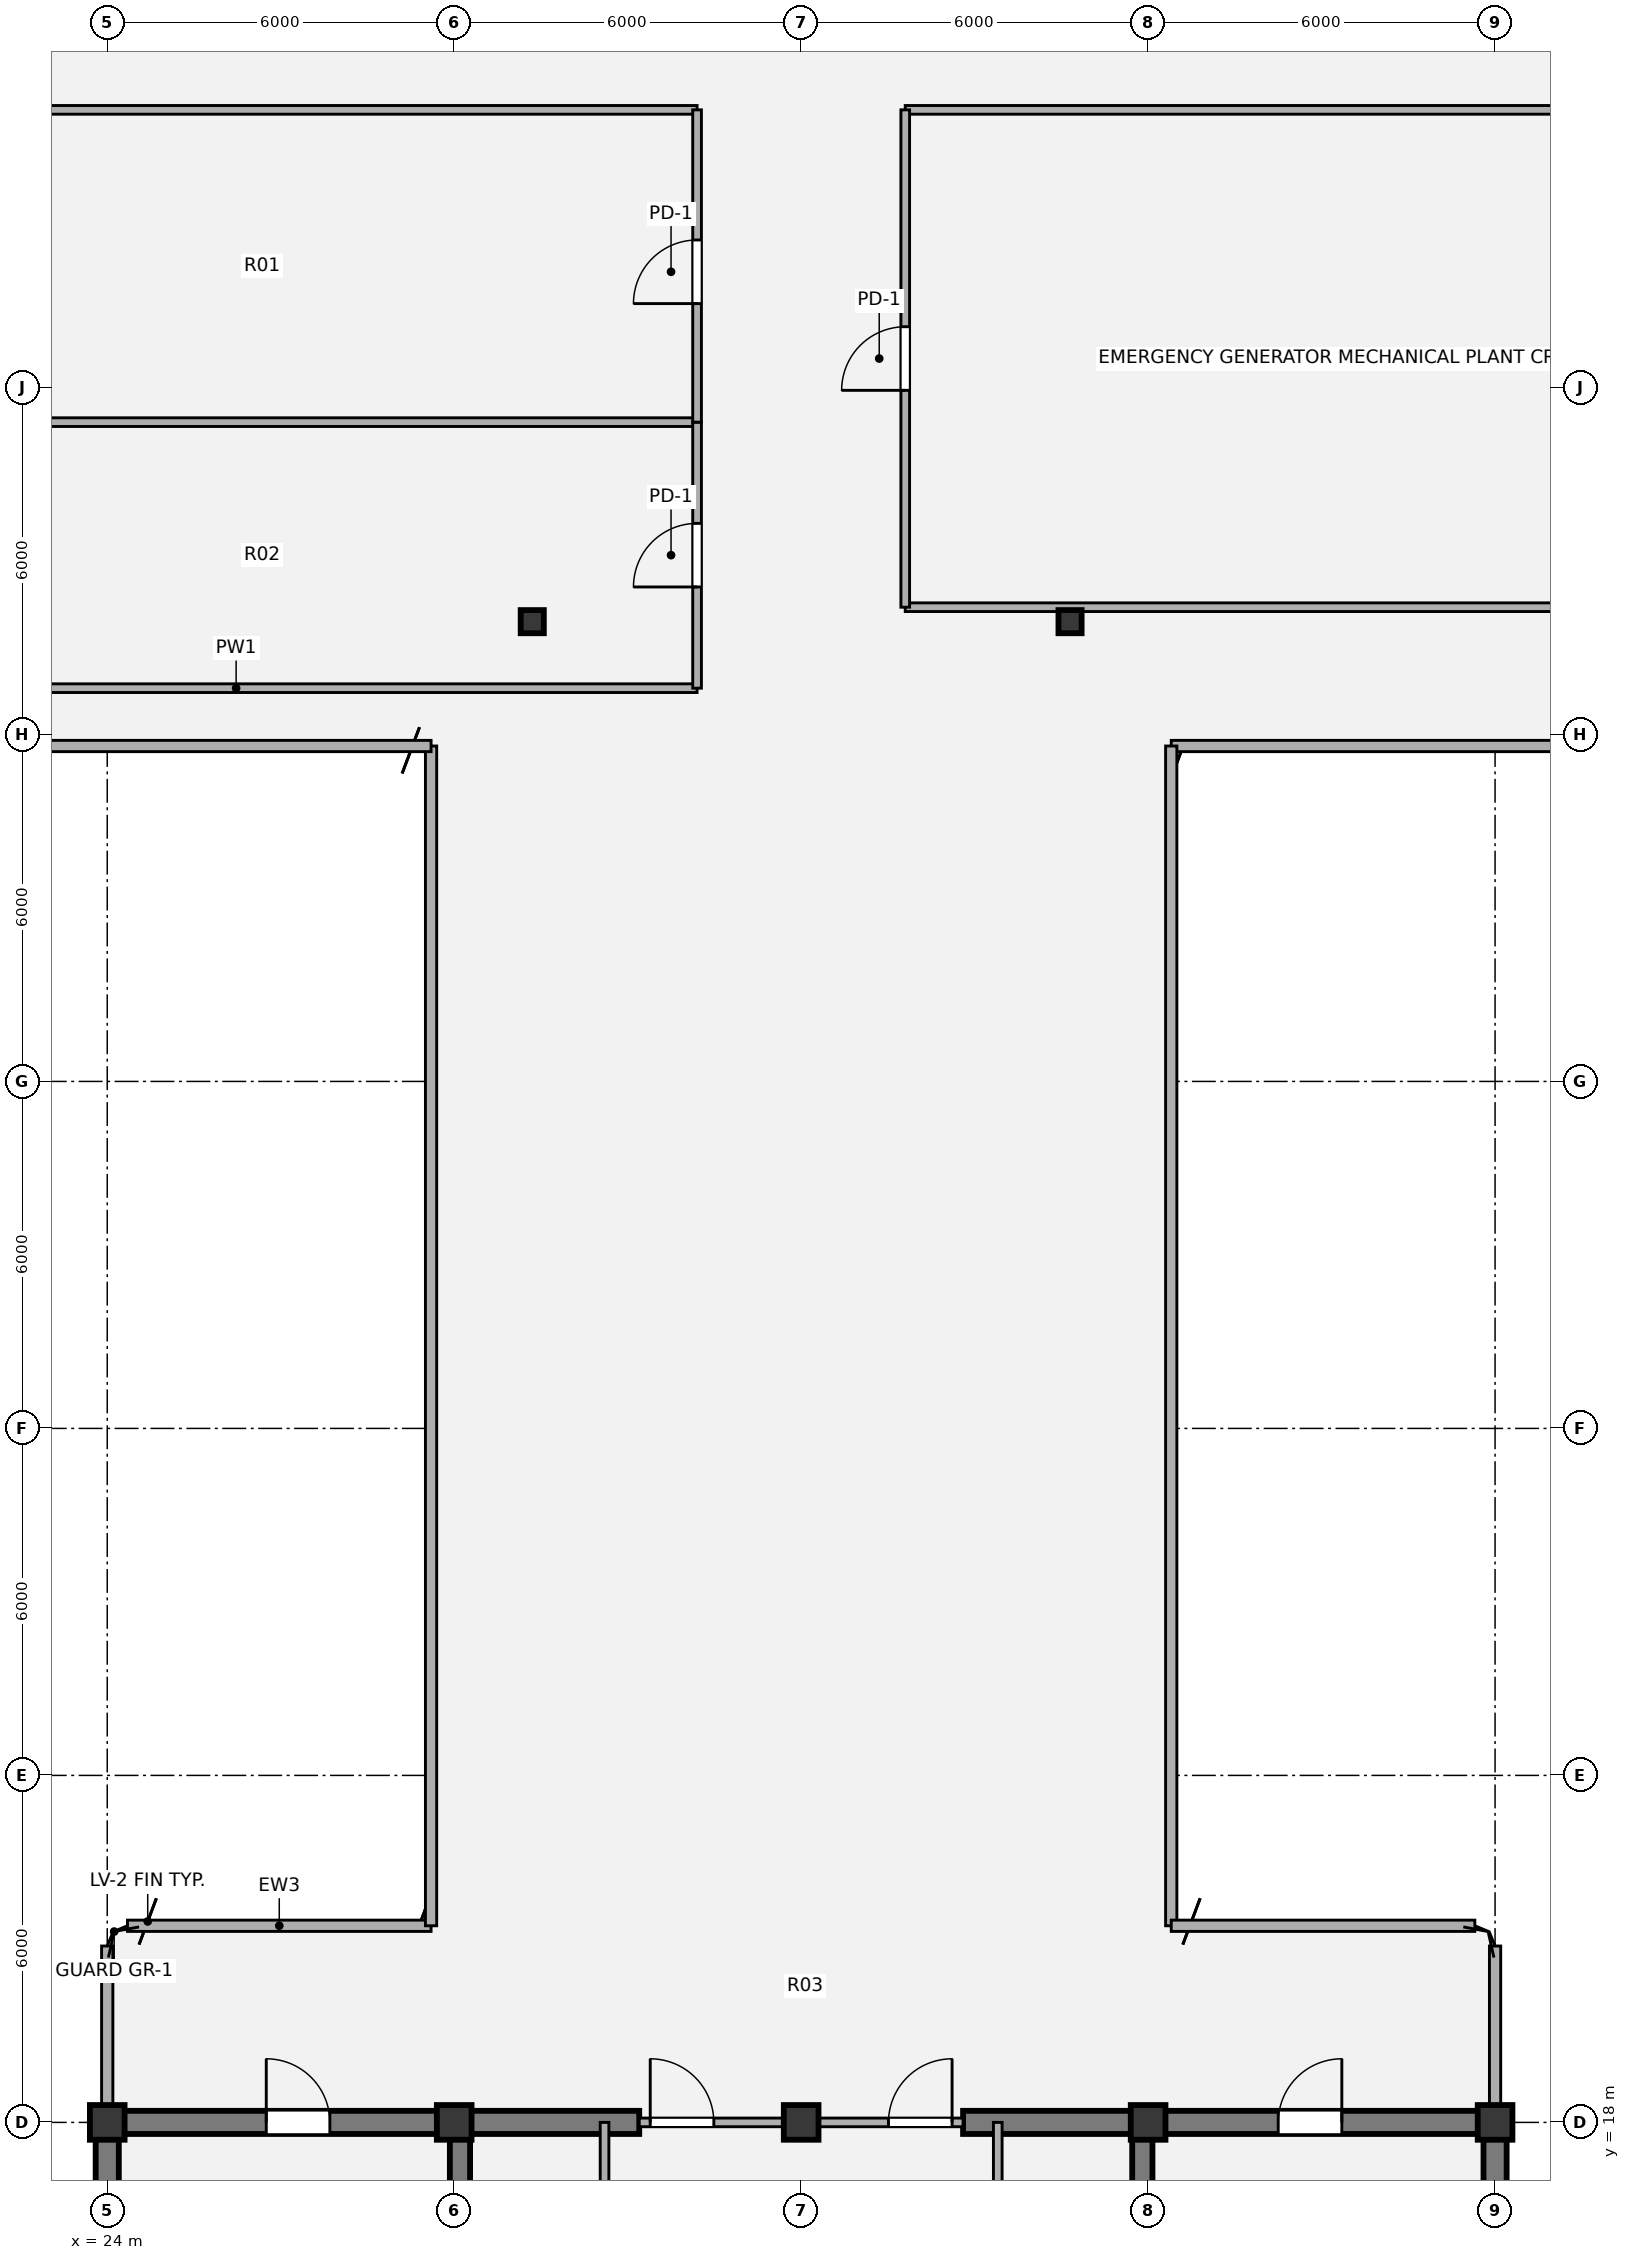
"""IFC4 building model, lengths in metres.
Left out: names, types, materials, properties, quantities, classifications, styles, units other than length and angle.
Written with IfcOpenShell. Run it as: python <this file> out.ifc"""

import sys

from ifc_helpers import new_model, si_unit, direction, frame, frame_2d, origin, origin_2d, place, context, subcontext, project, spatial, rectangle, hollow_rectangle, extrude, source, transform, mapped, element, fill, save


model = new_model("IFC4")
c1 = context("Model", 3, precision=1e-05, world=origin(), true_north=direction((0.0, 1.0)))
c2 = subcontext(c1, "Body", "Model", "MODEL_VIEW")
j1 = project(units=[si_unit("LENGTHUNIT", "METRE"), si_unit("PLANEANGLEUNIT", "RADIAN")], contexts=[c1])
p1 = place(None, origin())
s1 = spatial("IfcSite", under=j1, at=p1, CompositionType="ELEMENT")
p2 = place(p1, origin())
s2 = spatial("IfcBuilding", under=s1, at=p2, CompositionType="ELEMENT")
p3 = place(p2, frame((0.0, 0.0, 307.8)))
s3 = spatial("IfcBuildingStorey", under=s2, at=p3, CompositionType="ELEMENT", Elevation=307.8)
m1 = source(origin(), c2, "Body", "SweptSolid", [
    extrude(rectangle(XDim=0.6, YDim=0.6, at=origin_2d()), origin(), (0.0, 0.0, 1.0), 3.96),
])
for number, where, z_axis, x_axis in (
    (1, (24.0, 18.0, 0.0), (0.0, 0.0, 1.0), (1.0, 0.0, 0.0)),
    (2, (30.0, 18.0, 0.0), (0.0, 0.0, 1.0), (1.0, 0.0, 0.0)),
    (3, (36.0, 18.0, 0.0), (0.0, 0.0, 1.0), (1.0, 0.0, 0.0)),
    (4, (42.0, 18.0, 0.0), (0.0, 0.0, 1.0), (1.0, 0.0, 0.0)),
    (5, (48.0, 18.0, 0.0), (0.0, 0.0, 1.0), (1.0, 0.0, 0.0)),
):
    element("IfcColumn", number, at=place(p3, frame(where, z_axis=z_axis, x_axis=x_axis)), inside=s3, PredefinedType="COLUMN", context=c2, shape_type="MappedRepresentation", body=[
        mapped(m1, transform((0.0, 0.0, 0.0), x_axis=(1.0, 0.0, 0.0), y_axis=(0.0, 1.0, 0.0), z_axis=(0.0, 0.0, 1.0), scale=1.0)),
    ])
for number, where, z_axis, x_axis in (
    (6, (24.0, 6.0, 0.0), (0.0, 0.0, 1.0), (0.0, 1.0, 0.0)),
    (7, (48.0, 18.0, 0.0), (0.0, 0.0, 1.0), (0.0, -1.0, 0.0)),
):
    element("IfcWall", number, at=place(p3, frame(where, z_axis=z_axis, x_axis=x_axis)), inside=s3, PredefinedType="SHEAR", context=c2, shape_type="SweptSolid", body=[
        extrude(rectangle(XDim=12.0, YDim=0.4, at=frame_2d((6.0, 0.0))), origin(), (0.0, 0.0, 1.0), 3.96),
    ])
p4 = place(p3, frame((23.8, 18.0, 0.0), z_axis=(0.0, 0.0, 1.0), x_axis=(1.0, 0.0, 0.0)))
e8 = element("IfcWall", 8, at=p4, inside=s3, PredefinedType="SHEAR", context=c2, shape_type="SweptSolid", body=[
    extrude(rectangle(XDim=9.4, YDim=0.4, at=frame_2d((4.7, 0.0))), origin(), (0.0, 0.0, 1.0), 3.96),
])
p5 = place(p4, frame((2.95, 0.0, 0.0)))
e9 = element("IfcOpeningElement", 9, at=p5, cuts=e8, PredefinedType="OPENING", context=c2, shape_type="SweptSolid", body=[
    extrude(rectangle(XDim=1.1, YDim=2.1, at=origin_2d()), frame((0.55, 0.21, 1.05), z_axis=(0.0, -1.0, 0.0), x_axis=(1.0, 0.0, 0.0)), (0.0, 0.0, 1.0), 0.42),
])
p6 = place(p3, frame((38.8, 18.0, 0.0), z_axis=(0.0, 0.0, 1.0), x_axis=(1.0, 0.0, 0.0)))
e10 = element("IfcWall", 10, at=p6, inside=s3, PredefinedType="SHEAR", context=c2, shape_type="SweptSolid", body=[
    extrude(rectangle(XDim=9.4, YDim=0.4, at=frame_2d((4.7, 0.0))), origin(), (0.0, 0.0, 1.0), 3.96),
])
p7 = place(p6, frame((5.45, 0.0, 0.0)))
e11 = element("IfcOpeningElement", 11, at=p7, cuts=e10, PredefinedType="OPENING", context=c2, shape_type="SweptSolid", body=[
    extrude(rectangle(XDim=1.1, YDim=2.1, at=origin_2d()), frame((0.55, 0.21, 1.05), z_axis=(0.0, -1.0, 0.0), x_axis=(1.0, 0.0, 0.0)), (0.0, 0.0, 1.0), 0.42),
])
for number, where, z_axis, x_axis in (
    (12, (30.1, 6.0, 0.0), (0.0, 0.0, 1.0), (0.0, 1.0, 0.0)),
    (13, (41.9, 18.0, 0.0), (0.0, 0.0, 1.0), (0.0, -1.0, 0.0)),
):
    element("IfcWall", number, at=place(p3, frame(where, z_axis=z_axis, x_axis=x_axis)), inside=s3, PredefinedType="SHEAR", context=c2, shape_type="SweptSolid", body=[
        extrude(rectangle(XDim=12.0, YDim=0.35, at=frame_2d((6.0, 0.0))), origin(), (0.0, 0.0, 1.0), 3.96),
    ])
m2 = source(origin(), c2, "Body", "SweptSolid", [
    extrude(hollow_rectangle(XDim=0.4, YDim=0.4, WallThickness=0.02, OuterFilletRadius=0.04, at=origin_2d()), origin(), (0.0, 0.0, 1.0), 3.96),
])
for number, where, z_axis, x_axis in (
    (14, (31.35, 43.95, 0.0), (0.0, 0.0, 1.0), (1.0, 0.0, 0.0)),
    (15, (40.65, 43.95, 0.0), (0.0, 0.0, 1.0), (1.0, 0.0, 0.0)),
):
    element("IfcColumn", number, at=place(p3, frame(where, z_axis=z_axis, x_axis=x_axis)), inside=s3, PredefinedType="COLUMN", context=c2, shape_type="MappedRepresentation", body=[
        mapped(m2, transform((0.0, 0.0, 0.0), x_axis=(1.0, 0.0, 0.0), y_axis=(0.0, 1.0, 0.0), z_axis=(0.0, 0.0, 1.0), scale=1.0)),
    ])
for number, where, z_axis, x_axis in (
    (16, (48.0, 21.05, 0.0), (0.0, 0.0, 1.0), (0.0, -1.0, 0.0)),
    (17, (24.0, 18.28, 0.0), (0.0, 0.0, 1.0), (0.0, 1.0, 0.0)),
):
    element("IfcWall", number, at=place(p3, frame(where, z_axis=z_axis, x_axis=x_axis)), inside=s3, PredefinedType="SOLIDWALL", context=c2, shape_type="SweptSolid", body=[
        extrude(rectangle(XDim=2.77, YDim=0.195, at=frame_2d((1.385, 0.0))), origin(), (0.0, 0.0, 1.0), 2.898),
    ])
p8 = place(p3, frame((24.35, 21.4, 0.0), z_axis=(0.0, 0.0, 1.0), x_axis=(1.0, 0.0, 0.0)))
e18 = element("IfcWall", 18, at=p8, inside=s3, PredefinedType="SOLIDWALL", context=c2, shape_type="SweptSolid", body=[
    extrude(rectangle(XDim=5.25, YDim=0.195, at=frame_2d((2.625, 0.0))), origin(), (0.0, 0.0, 1.0), 3.71),
])
p9 = place(p3, frame((29.6, 21.4, 0.0), z_axis=(0.0, 0.0, 1.0), x_axis=(0.0, 1.0, 0.0)))
e19 = element("IfcWall", 19, at=p9, inside=s3, PredefinedType="SOLIDWALL", context=c2, shape_type="SweptSolid", body=[
    extrude(rectangle(XDim=20.4, YDim=0.195, at=frame_2d((10.2, 0.0))), origin(), (0.0, 0.0, 1.0), 2.998),
])
for number, where, z_axis, x_axis in (
    (20, (29.6, 41.8, 0.0), (0.0, 0.0, 1.0), (-1.0, 0.0, 0.0)),
    (21, (52.25, 41.8, 0.0), (0.0, 0.0, 1.0), (-1.0, 0.0, 0.0)),
):
    element("IfcWall", number, at=place(p3, frame(where, z_axis=z_axis, x_axis=x_axis)), inside=s3, PredefinedType="SOLIDWALL", context=c2, shape_type="SweptSolid", body=[
        extrude(rectangle(XDim=9.85, YDim=0.195, at=frame_2d((4.925, 0.0))), origin(), (0.0, 0.0, 1.0), 3.71),
    ])
p10 = place(p3, frame((42.4, 41.8, 0.0), z_axis=(0.0, 0.0, 1.0), x_axis=(0.0, -1.0, 0.0)))
e22 = element("IfcWall", 22, at=p10, inside=s3, PredefinedType="SOLIDWALL", context=c2, shape_type="SweptSolid", body=[
    extrude(rectangle(XDim=20.4, YDim=0.195, at=frame_2d((10.2, 0.0))), origin(), (0.0, 0.0, 1.0), 2.998),
])
p11 = place(p3, frame((42.4, 21.4, 0.0), z_axis=(0.0, 0.0, 1.0), x_axis=(1.0, 0.0, 0.0)))
e23 = element("IfcWall", 23, at=p11, inside=s3, PredefinedType="SOLIDWALL", context=c2, shape_type="SweptSolid", body=[
    extrude(rectangle(XDim=5.25, YDim=0.195, at=frame_2d((2.625, 0.0))), origin(), (0.0, 0.0, 1.0), 3.71),
])
p12 = place(p3, frame((32.6, 11.0, 0.0), z_axis=(0.0, 0.0, 1.0), x_axis=(0.0, 1.0, 0.0)))
e24 = element("IfcWall", 24, at=p12, inside=s3, PredefinedType="PARTITIONING", context=c2, shape_type="SweptSolid", body=[
    extrude(rectangle(XDim=7.0, YDim=0.15, at=frame_2d((3.5, 0.0))), origin(), (0.0, 0.0, 1.0), 3.68),
])
p13 = place(p12, frame((2.4, 0.0, 0.0)))
e25 = element("IfcOpeningElement", 25, at=p13, cuts=e24, PredefinedType="OPENING", context=c2, shape_type="SweptSolid", body=[
    extrude(rectangle(XDim=1.1, YDim=2.1, at=origin_2d()), frame((0.55, 0.085, 1.05), z_axis=(0.0, -1.0, 0.0), x_axis=(1.0, 0.0, 0.0)), (0.0, 0.0, 1.0), 0.17),
])
p14 = place(p3, frame((39.4, 11.0, 0.0), z_axis=(0.0, 0.0, 1.0), x_axis=(0.0, 1.0, 0.0)))
e26 = element("IfcWall", 26, at=p14, inside=s3, PredefinedType="PARTITIONING", context=c2, shape_type="SweptSolid", body=[
    extrude(rectangle(XDim=7.0, YDim=0.15, at=frame_2d((3.5, 0.0))), origin(), (0.0, 0.0, 1.0), 3.68),
])
p15 = place(p14, frame((2.4, 0.0, 0.0)))
e27 = element("IfcOpeningElement", 27, at=p15, cuts=e26, PredefinedType="OPENING", context=c2, shape_type="SweptSolid", body=[
    extrude(rectangle(XDim=1.1, YDim=2.1, at=origin_2d()), frame((0.55, 0.085, 1.05), z_axis=(0.0, -1.0, 0.0), x_axis=(1.0, 0.0, 0.0)), (0.0, 0.0, 1.0), 0.17),
])
p16 = place(p3, frame((33.2, 18.0, 0.0), z_axis=(0.0, 0.0, 1.0), x_axis=(1.0, 0.0, 0.0)))
e28 = element("IfcWall", 28, at=p16, inside=s3, PredefinedType="PARTITIONING", context=c2, shape_type="SweptSolid", body=[
    extrude(rectangle(XDim=5.6, YDim=0.15, at=frame_2d((2.8, 0.0))), origin(), (0.0, 0.0, 1.0), 2.695),
])
p17 = place(p16, frame((0.19, 0.0, 0.0)))
e29 = element("IfcOpeningElement", 29, at=p17, cuts=e28, PredefinedType="OPENING", context=c2, shape_type="SweptSolid", body=[
    extrude(rectangle(XDim=1.1, YDim=2.1, at=origin_2d()), frame((0.55, 0.085, 1.05), z_axis=(0.0, -1.0, 0.0), x_axis=(1.0, 0.0, 0.0)), (0.0, 0.0, 1.0), 0.17),
])
p18 = place(p16, frame((4.31, 0.0, 0.0)))
e30 = element("IfcOpeningElement", 30, at=p18, cuts=e28, PredefinedType="OPENING", context=c2, shape_type="SweptSolid", body=[
    extrude(rectangle(XDim=1.1, YDim=2.1, at=origin_2d()), frame((0.55, 0.085, 1.05), z_axis=(0.0, -1.0, 0.0), x_axis=(1.0, 0.0, 0.0)), (0.0, 0.0, 1.0), 0.17),
])
p19 = place(p3, frame((18.258, 42.8, 0.0), z_axis=(0.0, 0.0, 1.0), x_axis=(1.0, 0.0, 0.0)))
e31 = element("IfcWall", 31, at=p19, inside=s3, PredefinedType="PARTITIONING", context=c2, shape_type="SweptSolid", body=[
    extrude(rectangle(XDim=15.942, YDim=0.15, at=frame_2d((7.971, 0.0))), origin(), (0.0, 0.0, 1.0), 3.68),
])
p20 = place(p3, frame((37.8, 44.2, 0.0), z_axis=(0.0, 0.0, 1.0), x_axis=(1.0, 0.0, 0.0)))
e32 = element("IfcWall", 32, at=p20, inside=s3, PredefinedType="PARTITIONING", context=c2, shape_type="SweptSolid", body=[
    extrude(rectangle(XDim=15.05, YDim=0.15, at=frame_2d((7.525, 0.0))), origin(), (0.0, 0.0, 1.0), 3.083),
])
for number, where, z_axis, x_axis in (
    (33, (19.15, 47.4, 0.0), (0.0, 0.0, 1.0), (1.0, 0.0, 0.0)),
    (34, (19.15, 52.8, 0.0), (0.0, 0.0, 1.0), (1.0, 0.0, 0.0)),
    (35, (37.8, 52.8, 0.0), (0.0, 0.0, 1.0), (1.0, 0.0, 0.0)),
):
    element("IfcWall", number, at=place(p3, frame(where, z_axis=z_axis, x_axis=x_axis)), inside=s3, PredefinedType="PARTITIONING", context=c2, shape_type="SweptSolid", body=[
        extrude(rectangle(XDim=15.05, YDim=0.15, at=frame_2d((7.525, 0.0))), origin(), (0.0, 0.0, 1.0), 3.162),
    ])
p21 = place(p3, frame((34.2, 42.8, 0.0), z_axis=(0.0, 0.0, 1.0), x_axis=(0.0, 1.0, 0.0)))
e36 = element("IfcWall", 36, at=p21, inside=s3, PredefinedType="PARTITIONING", context=c2, shape_type="SweptSolid", body=[
    extrude(rectangle(XDim=4.6, YDim=0.15, at=frame_2d((2.3, 0.0))), origin(), (0.0, 0.0, 1.0), 3.68),
])
p22 = place(p21, frame((1.75, 0.0, 0.0)))
e37 = element("IfcOpeningElement", 37, at=p22, cuts=e36, PredefinedType="OPENING", context=c2, shape_type="SweptSolid", body=[
    extrude(rectangle(XDim=1.1, YDim=2.1, at=origin_2d()), frame((0.55, 0.085, 1.05), z_axis=(0.0, -1.0, 0.0), x_axis=(1.0, 0.0, 0.0)), (0.0, 0.0, 1.0), 0.17),
])
p23 = place(p3, frame((34.2, 47.4, 0.0), z_axis=(0.0, 0.0, 1.0), x_axis=(0.0, 1.0, 0.0)))
e38 = element("IfcWall", 38, at=p23, inside=s3, PredefinedType="PARTITIONING", context=c2, shape_type="SweptSolid", body=[
    extrude(rectangle(XDim=5.4, YDim=0.15, at=frame_2d((2.7, 0.0))), origin(), (0.0, 0.0, 1.0), 3.68),
])
p24 = place(p23, frame((2.05, 0.0, 0.0)))
e39 = element("IfcOpeningElement", 39, at=p24, cuts=e38, PredefinedType="OPENING", context=c2, shape_type="SweptSolid", body=[
    extrude(rectangle(XDim=1.1, YDim=2.1, at=origin_2d()), frame((0.55, 0.085, 1.05), z_axis=(0.0, -1.0, 0.0), x_axis=(1.0, 0.0, 0.0)), (0.0, 0.0, 1.0), 0.17),
])
p25 = place(p3, frame((37.8, 44.2, 0.0), z_axis=(0.0, 0.0, 1.0), x_axis=(0.0, 1.0, 0.0)))
e40 = element("IfcWall", 40, at=p25, inside=s3, PredefinedType="PARTITIONING", context=c2, shape_type="SweptSolid", body=[
    extrude(rectangle(XDim=8.6, YDim=0.15, at=frame_2d((4.3, 0.0))), origin(), (0.0, 0.0, 1.0), 3.68),
])
p26 = place(p25, frame((3.75, 0.0, 0.0)))
e41 = element("IfcOpeningElement", 41, at=p26, cuts=e40, PredefinedType="OPENING", context=c2, shape_type="SweptSolid", body=[
    extrude(rectangle(XDim=1.1, YDim=2.1, at=origin_2d()), frame((0.55, 0.085, 1.05), z_axis=(0.0, -1.0, 0.0), x_axis=(1.0, 0.0, 0.0)), (0.0, 0.0, 1.0), 0.17),
])
m3 = source(origin(), c2, "Body", "SweptSolid", [
    extrude(rectangle(XDim=1.1, YDim=2.1, at=origin_2d()), frame((0.55, 0.025, 1.05), z_axis=(0.0, -1.0, 0.0), x_axis=(1.0, 0.0, 0.0)), (0.0, 0.0, 1.0), 0.05),
])
p27 = place(p17, origin())
e42 = element("IfcDoor", 42, at=p27, inside=s3, OperationType="SINGLE_SWING_LEFT", PredefinedType="DOOR", context=c2, shape_type="MappedRepresentation", body=[
    mapped(m3, transform((0.0, 0.0, 0.0), x_axis=(1.0, 0.0, 0.0), y_axis=(0.0, 1.0, 0.0), z_axis=(0.0, 0.0, 1.0), scale=1.0)),
])
fill(e29, e42)
p28 = place(p18, origin())
e43 = element("IfcDoor", 43, at=p28, inside=s3, OperationType="SINGLE_SWING_RIGHT", PredefinedType="DOOR", context=c2, shape_type="MappedRepresentation", body=[
    mapped(m3, transform((0.0, 0.0, 0.0), x_axis=(1.0, 0.0, 0.0), y_axis=(0.0, 1.0, 0.0), z_axis=(0.0, 0.0, 1.0), scale=1.0)),
])
fill(e30, e43)
p29 = place(p5, origin())
e44 = element("IfcDoor", 44, at=p29, inside=s3, OperationType="SINGLE_SWING_LEFT", PredefinedType="DOOR", context=c2, shape_type="MappedRepresentation", body=[
    mapped(m3, transform((0.0, 0.0, 0.0), x_axis=(1.0, 0.0, 0.0), y_axis=(0.0, 1.0, 0.0), z_axis=(0.0, 0.0, 1.0), scale=1.0)),
])
fill(e9, e44)
p30 = place(p7, origin())
e45 = element("IfcDoor", 45, at=p30, inside=s3, OperationType="SINGLE_SWING_RIGHT", PredefinedType="DOOR", context=c2, shape_type="MappedRepresentation", body=[
    mapped(m3, transform((0.0, 0.0, 0.0), x_axis=(1.0, 0.0, 0.0), y_axis=(0.0, 1.0, 0.0), z_axis=(0.0, 0.0, 1.0), scale=1.0)),
])
fill(e11, e45)
m4 = source(origin(), c2, "Body", "SweptSolid", [
    extrude(rectangle(XDim=1.1, YDim=2.1, at=origin_2d()), frame((0.55, 0.025, 1.05), z_axis=(0.0, -1.0, 0.0), x_axis=(1.0, 0.0, 0.0)), (0.0, 0.0, 1.0), 0.05),
])
p31 = place(p22, origin())
e46 = element("IfcDoor", 46, at=p31, inside=s3, OperationType="SINGLE_SWING_LEFT", PredefinedType="DOOR", context=c2, shape_type="MappedRepresentation", body=[
    mapped(m4, transform((0.0, 0.0, 0.0), x_axis=(1.0, 0.0, 0.0), y_axis=(0.0, 1.0, 0.0), z_axis=(0.0, 0.0, 1.0), scale=1.0)),
])
fill(e37, e46)
p32 = place(p24, origin())
e47 = element("IfcDoor", 47, at=p32, inside=s3, OperationType="SINGLE_SWING_LEFT", PredefinedType="DOOR", context=c2, shape_type="MappedRepresentation", body=[
    mapped(m4, transform((0.0, 0.0, 0.0), x_axis=(1.0, 0.0, 0.0), y_axis=(0.0, 1.0, 0.0), z_axis=(0.0, 0.0, 1.0), scale=1.0)),
])
fill(e39, e47)
p33 = place(p26, origin())
e48 = element("IfcDoor", 48, at=p33, inside=s3, OperationType="SINGLE_SWING_LEFT", PredefinedType="DOOR", context=c2, shape_type="MappedRepresentation", body=[
    mapped(m4, transform((0.0, 0.0, 0.0), x_axis=(1.0, 0.0, 0.0), y_axis=(0.0, 1.0, 0.0), z_axis=(0.0, 0.0, 1.0), scale=1.0)),
])
fill(e41, e48)
save(model, sys.argv[1])
